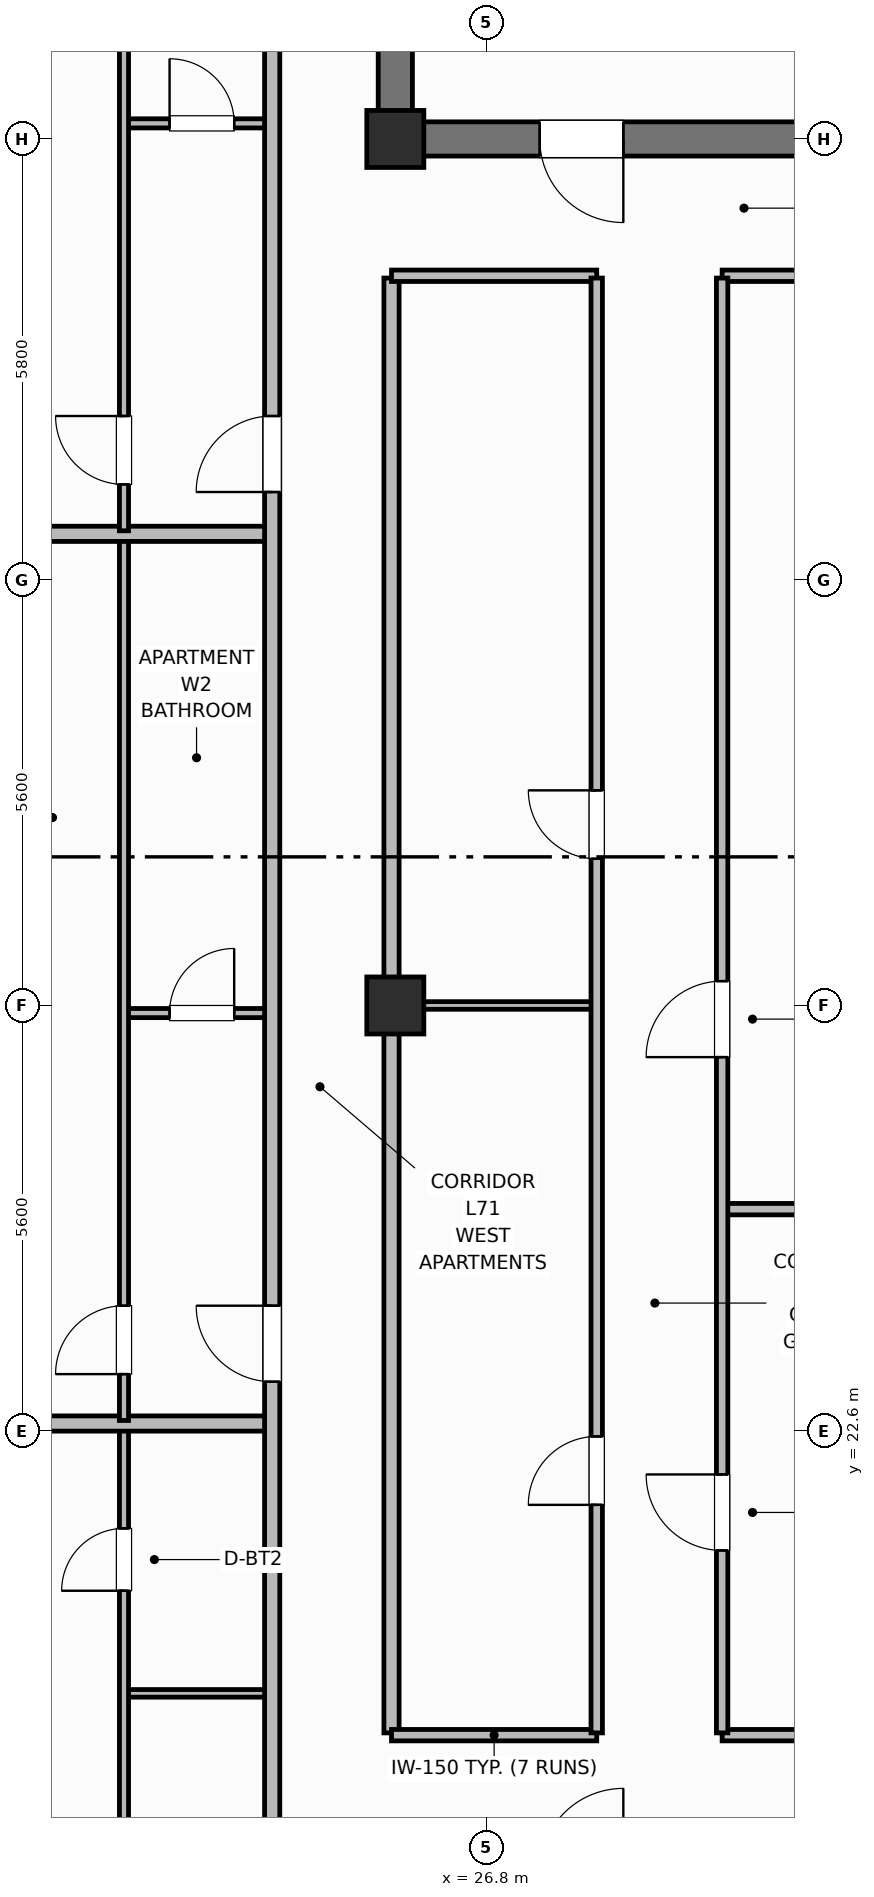
"""IFC4 building model, lengths in metres.
Left out: names, types, materials, properties, quantities, classifications, styles, units other than length and angle.
Written with IfcOpenShell. Run it as: python <this file> out.ifc"""

import sys

from ifc_helpers import new_model, si_unit, direction, frame, frame_2d, origin, origin_2d, place, context, subcontext, project, spatial, rectangle, extrude, element, fill, save


model = new_model("IFC4")
c1 = context("Model", 3, precision=1e-05, world=origin(), true_north=direction((0.0, 1.0)))
c2 = subcontext(c1, "Body", "Model", "MODEL_VIEW")
j1 = project(units=[si_unit("LENGTHUNIT", "METRE"), si_unit("PLANEANGLEUNIT", "RADIAN")], contexts=[c1])
p1 = place(None, origin())
s1 = spatial("IfcSite", under=j1, at=p1, CompositionType="ELEMENT")
p2 = place(p1, origin())
s2 = spatial("IfcBuilding", under=s1, at=p2, CompositionType="ELEMENT")
p3 = place(p2, frame((0.0, 0.0, 282.4)))
s3 = spatial("IfcBuildingStorey", under=s2, at=p3, CompositionType="ELEMENT", Elevation=282.4)
p4 = place(p3, frame((25.6, 39.825, 0.0), z_axis=(0.0, 0.0, 1.0), x_axis=(0.0, 1.0, 0.0)))
e1 = element("IfcWall", 1, at=p4, inside=s3, PredefinedType="SHEAR", context=c2, shape_type="SweptSolid", body=[
    extrude(rectangle(XDim=5.75, YDim=0.45, at=frame_2d((2.875, 0.0))), origin(), (0.0, 0.0, 1.0), 3.7),
])
p5 = place(p3, frame((52.8, 39.6, 0.0), z_axis=(0.0, 0.0, 1.0), x_axis=(-1.0, 0.0, 0.0)))
e2 = element("IfcWall", 2, at=p5, inside=s3, PredefinedType="SHEAR", context=c2, shape_type="SweptSolid", body=[
    extrude(rectangle(XDim=27.2, YDim=0.45, at=frame_2d((13.6, 0.0))), origin(), (0.0, 0.0, 1.0), 3.7),
])
p6 = place(p5, frame((24.2, 0.0, 0.0)))
e3 = element("IfcOpeningElement", 3, at=p6, cuts=e2, PredefinedType="OPENING", context=c2, shape_type="SweptSolid", body=[
    extrude(rectangle(XDim=1.1, YDim=2.15, at=frame_2d((0.55, 1.075))), frame((0.0, 0.235, 0.0), z_axis=(0.0, -1.0, 0.0), x_axis=(1.0, 0.0, 0.0)), (0.0, 0.0, 1.0), 0.47),
])
p7 = place(p5, frame((15.1, 0.0, 0.0)))
e4 = element("IfcOpeningElement", 4, at=p7, cuts=e2, PredefinedType="OPENING", context=c2, shape_type="SweptSolid", body=[
    extrude(rectangle(XDim=1.2, YDim=2.15, at=frame_2d((0.6, 1.075))), frame((0.0, 0.235, 0.0), z_axis=(0.0, -1.0, 0.0), x_axis=(1.0, 0.0, 0.0)), (0.0, 0.0, 1.0), 0.47),
])
p8 = place(p5, frame((11.6, 0.0, 0.0)))
e5 = element("IfcOpeningElement", 5, at=p8, cuts=e2, PredefinedType="OPENING", context=c2, shape_type="SweptSolid", body=[
    extrude(rectangle(XDim=0.9, YDim=2.1, at=frame_2d((0.45, 1.05))), frame((0.0, 0.235, 0.0), z_axis=(0.0, -1.0, 0.0), x_axis=(1.0, 0.0, 0.0)), (0.0, 0.0, 1.0), 0.47),
])
p9 = place(p5, frame((7.35, 0.0, 0.0)))
e6 = element("IfcOpeningElement", 6, at=p9, cuts=e2, PredefinedType="OPENING", context=c2, shape_type="SweptSolid", body=[
    extrude(rectangle(XDim=0.85, YDim=2.1, at=frame_2d((0.425, 1.05))), frame((0.0, 0.235, 0.0), z_axis=(0.0, -1.0, 0.0), x_axis=(1.0, 0.0, 0.0)), (0.0, 0.0, 1.0), 0.47),
])
p10 = place(p5, frame((4.2, 0.0, 0.0)))
e7 = element("IfcOpeningElement", 7, at=p10, cuts=e2, PredefinedType="OPENING", context=c2, shape_type="SweptSolid", body=[
    extrude(rectangle(XDim=1.3, YDim=2.2, at=frame_2d((0.65, 1.1))), frame((0.0, 0.235, 0.0), z_axis=(0.0, -1.0, 0.0), x_axis=(1.0, 0.0, 0.0)), (0.0, 0.0, 1.0), 0.47),
])
for number, where, z_axis, x_axis in (
    (8, (25.6, 39.6, 0.0), (0.0, 0.0, 1.0), (1.0, 0.0, 0.0)),
    (9, (25.6, 28.2, 0.0), (0.0, 0.0, 1.0), (1.0, 0.0, 0.0)),
):
    element("IfcColumn", number, at=place(p3, frame(where, z_axis=z_axis, x_axis=x_axis)), inside=s3, PredefinedType="COLUMN", context=c2, shape_type="SweptSolid", body=[
        extrude(rectangle(XDim=0.75, YDim=0.75, at=origin_2d()), origin(), (0.0, 0.0, 1.0), 3.7),
    ])
p11 = place(p3, frame((25.55, 18.63, 0.0), z_axis=(0.0, 0.0, 1.0), x_axis=(0.0, 1.0, 0.0)))
e10 = element("IfcWall", 10, at=p11, inside=s3, PredefinedType="PARTITIONING", context=c2, shape_type="SweptSolid", body=[
    extrude(rectangle(XDim=19.14, YDim=0.2, at=frame_2d((9.57, 0.0))), origin(), (0.0, 0.0, 1.0), 2.56),
])
p12 = place(p3, frame((25.55, 18.6, 0.0), z_axis=(0.0, 0.0, 1.0), x_axis=(1.0, 0.0, 0.0)))
e11 = element("IfcWall", 11, at=p12, inside=s3, PredefinedType="PARTITIONING", context=c2, shape_type="SweptSolid", body=[
    extrude(rectangle(XDim=2.7, YDim=0.15, at=frame_2d((1.35, 0.0))), origin(), (0.0, 0.0, 1.0), 2.56),
])
p13 = place(p3, frame((29.9, 18.6, 0.0), z_axis=(0.0, 0.0, 1.0), x_axis=(1.0, 0.0, 0.0)))
e12 = element("IfcWall", 12, at=p13, inside=s3, PredefinedType="PARTITIONING", context=c2, shape_type="SweptSolid", body=[
    extrude(rectangle(XDim=22.95, YDim=0.15, at=frame_2d((11.475, 0.0))), origin(), (0.0, 0.0, 1.0), 2.56),
])
p14 = place(p3, frame((25.55, 37.8, 0.0), z_axis=(0.0, 0.0, 1.0), x_axis=(1.0, 0.0, 0.0)))
e13 = element("IfcWall", 13, at=p14, inside=s3, PredefinedType="PARTITIONING", context=c2, shape_type="SweptSolid", body=[
    extrude(rectangle(XDim=2.7, YDim=0.15, at=frame_2d((1.35, 0.0))), origin(), (0.0, 0.0, 1.0), 2.56),
])
p15 = place(p3, frame((29.9, 37.8, 0.0), z_axis=(0.0, 0.0, 1.0), x_axis=(1.0, 0.0, 0.0)))
e14 = element("IfcWall", 14, at=p15, inside=s3, PredefinedType="PARTITIONING", context=c2, shape_type="SweptSolid", body=[
    extrude(rectangle(XDim=22.95, YDim=0.15, at=frame_2d((11.475, 0.0))), origin(), (0.0, 0.0, 1.0), 2.56),
])
p16 = place(p3, frame((25.6, 28.2, 0.0), z_axis=(0.0, 0.0, 1.0), x_axis=(1.0, 0.0, 0.0)))
e15 = element("IfcWall", 15, at=p16, inside=s3, PredefinedType="PARTITIONING", context=c2, shape_type="SweptSolid", body=[
    extrude(rectangle(XDim=2.66, YDim=0.1, at=frame_2d((1.33, 0.0))), origin(), (0.0, 0.0, 1.0), 2.56),
])
p17 = place(p3, frame((29.93, 25.521, 0.0), z_axis=(0.0, 0.0, 1.0), x_axis=(1.0, 0.0, 0.0)))
e16 = element("IfcWall", 16, at=p17, inside=s3, PredefinedType="PARTITIONING", context=c2, shape_type="SweptSolid", body=[
    extrude(rectangle(XDim=22.87, YDim=0.15, at=frame_2d((11.435, 0.0))), origin(), (0.0, 0.0, 1.0), 2.56),
])
p18 = place(p3, frame((28.25, 18.63, 0.0), z_axis=(0.0, 0.0, 1.0), x_axis=(0.0, 1.0, 0.0)))
e17 = element("IfcWall", 17, at=p18, inside=s3, PredefinedType="PARTITIONING", context=c2, shape_type="SweptSolid", body=[
    extrude(rectangle(XDim=19.14, YDim=0.15, at=frame_2d((9.57, 0.0))), origin(), (0.0, 0.0, 1.0), 2.56),
])
p19 = place(p18, frame((3.0, 0.0, 0.0)))
e18 = element("IfcOpeningElement", 18, at=p19, cuts=e17, PredefinedType="OPENING", context=c2, shape_type="SweptSolid", body=[
    extrude(rectangle(XDim=0.9, YDim=2.1, at=frame_2d((0.45, 1.05))), frame((0.0, 0.085, 0.0), z_axis=(0.0, -1.0, 0.0), x_axis=(1.0, 0.0, 0.0)), (0.0, 0.0, 1.0), 0.17),
])
p20 = place(p18, frame((11.5, 0.0, 0.0)))
e19 = element("IfcOpeningElement", 19, at=p20, cuts=e17, PredefinedType="OPENING", context=c2, shape_type="SweptSolid", body=[
    extrude(rectangle(XDim=0.9, YDim=2.1, at=frame_2d((0.45, 1.05))), frame((0.0, 0.085, 0.0), z_axis=(0.0, -1.0, 0.0), x_axis=(1.0, 0.0, 0.0)), (0.0, 0.0, 1.0), 0.17),
])
p21 = place(p3, frame((29.9, 18.63, 0.0), z_axis=(0.0, 0.0, 1.0), x_axis=(0.0, 1.0, 0.0)))
e20 = element("IfcWall", 20, at=p21, inside=s3, PredefinedType="PARTITIONING", context=c2, shape_type="SweptSolid", body=[
    extrude(rectangle(XDim=19.14, YDim=0.15, at=frame_2d((9.57, 0.0))), origin(), (0.0, 0.0, 1.0), 2.56),
])
p22 = place(p21, frame((2.4, 0.0, 0.0)))
e21 = element("IfcOpeningElement", 21, at=p22, cuts=e20, PredefinedType="OPENING", context=c2, shape_type="SweptSolid", body=[
    extrude(rectangle(XDim=1.0, YDim=2.15, at=frame_2d((0.5, 1.075))), frame((0.0, 0.085, 0.0), z_axis=(0.0, -1.0, 0.0), x_axis=(1.0, 0.0, 0.0)), (0.0, 0.0, 1.0), 0.17),
])
p23 = place(p21, frame((8.89, 0.0, 0.0)))
e22 = element("IfcOpeningElement", 22, at=p23, cuts=e20, PredefinedType="OPENING", context=c2, shape_type="SweptSolid", body=[
    extrude(rectangle(XDim=1.0, YDim=2.15, at=frame_2d((0.5, 1.075))), frame((0.0, 0.085, 0.0), z_axis=(0.0, -1.0, 0.0), x_axis=(1.0, 0.0, 0.0)), (0.0, 0.0, 1.0), 0.17),
])
p24 = place(p3, frame((22.03, 19.15, 0.0), z_axis=(0.0, 0.0, 1.0), x_axis=(1.0, 0.0, 0.0)))
e23 = element("IfcWall", 23, at=p24, inside=s3, PredefinedType="PARTITIONING", context=c2, shape_type="SweptSolid", body=[
    extrude(rectangle(XDim=1.95, YDim=0.1, at=frame_2d((0.975, 0.0))), origin(), (0.0, 0.0, 1.0), 2.56),
])
p25 = place(p3, frame((22.03, 9.99, 0.0), z_axis=(0.0, 0.0, 1.0), x_axis=(0.0, 1.0, 0.0)))
e24 = element("IfcWall", 24, at=p25, inside=s3, PredefinedType="PARTITIONING", context=c2, shape_type="SweptSolid", body=[
    extrude(rectangle(XDim=12.67, YDim=0.12, at=frame_2d((6.335, 0.0))), origin(), (0.0, 0.0, 1.0), 2.56),
])
p26 = place(p25, frame((0.41, 0.0, 0.0)))
e25 = element("IfcOpeningElement", 25, at=p26, cuts=e24, PredefinedType="OPENING", context=c2, shape_type="SweptSolid", body=[
    extrude(rectangle(XDim=0.9, YDim=2.1, at=frame_2d((0.45, 1.05))), frame((0.0, 0.07, 0.0), z_axis=(0.0, -1.0, 0.0), x_axis=(1.0, 0.0, 0.0)), (0.0, 0.0, 1.0), 0.14),
])
p27 = place(p25, frame((10.51, 0.0, 0.0)))
e26 = element("IfcOpeningElement", 26, at=p27, cuts=e24, PredefinedType="OPENING", context=c2, shape_type="SweptSolid", body=[
    extrude(rectangle(XDim=0.82, YDim=2.08, at=frame_2d((0.41, 1.04))), frame((0.0, 0.07, 0.0), z_axis=(0.0, -1.0, 0.0), x_axis=(1.0, 0.0, 0.0)), (0.0, 0.0, 1.0), 0.14),
])
p28 = place(p3, frame((19.53, 22.7, 0.0), z_axis=(0.0, 0.0, 1.0), x_axis=(1.0, 0.0, 0.0)))
e27 = element("IfcWall", 27, at=p28, inside=s3, PredefinedType="PARTITIONING", context=c2, shape_type="SweptSolid", body=[
    extrude(rectangle(XDim=4.45, YDim=0.2, at=frame_2d((2.225, 0.0))), origin(), (0.0, 0.0, 1.0), 2.56),
])
p29 = place(p3, frame((22.03, 28.1, 0.0), z_axis=(0.0, 0.0, 1.0), x_axis=(1.0, 0.0, 0.0)))
e28 = element("IfcWall", 28, at=p29, inside=s3, PredefinedType="PARTITIONING", context=c2, shape_type="SweptSolid", body=[
    extrude(rectangle(XDim=1.95, YDim=0.12, at=frame_2d((0.975, 0.0))), origin(), (0.0, 0.0, 1.0), 2.56),
])
p30 = place(p29, frame((0.6, 0.0, 0.0)))
e29 = element("IfcOpeningElement", 29, at=p30, cuts=e28, PredefinedType="OPENING", context=c2, shape_type="SweptSolid", body=[
    extrude(rectangle(XDim=0.85, YDim=2.1, at=frame_2d((0.425, 1.05))), frame((0.0, 0.07, 0.0), z_axis=(0.0, -1.0, 0.0), x_axis=(1.0, 0.0, 0.0)), (0.0, 0.0, 1.0), 0.14),
])
p31 = place(p3, frame((22.03, 22.74, 0.0), z_axis=(0.0, 0.0, 1.0), x_axis=(0.0, 1.0, 0.0)))
e30 = element("IfcWall", 30, at=p31, inside=s3, PredefinedType="PARTITIONING", context=c2, shape_type="SweptSolid", body=[
    extrude(rectangle(XDim=11.625, YDim=0.12, at=frame_2d((5.812, 0.0))), origin(), (0.0, 0.0, 1.0), 2.56),
])
p32 = place(p31, frame((0.61, 0.0, 0.0)))
e31 = element("IfcOpeningElement", 31, at=p32, cuts=e30, PredefinedType="OPENING", context=c2, shape_type="SweptSolid", body=[
    extrude(rectangle(XDim=0.9, YDim=2.1, at=frame_2d((0.45, 1.05))), frame((0.0, 0.07, 0.0), z_axis=(0.0, -1.0, 0.0), x_axis=(1.0, 0.0, 0.0)), (0.0, 0.0, 1.0), 0.14),
])
p33 = place(p3, frame((19.53, 34.405, 0.0), z_axis=(0.0, 0.0, 1.0), x_axis=(1.0, 0.0, 0.0)))
e32 = element("IfcWall", 32, at=p33, inside=s3, PredefinedType="PARTITIONING", context=c2, shape_type="SweptSolid", body=[
    extrude(rectangle(XDim=4.45, YDim=0.2, at=frame_2d((2.225, 0.0))), origin(), (0.0, 0.0, 1.0), 2.56),
])
p34 = place(p3, frame((22.03, 39.805, 0.0), z_axis=(0.0, 0.0, 1.0), x_axis=(1.0, 0.0, 0.0)))
e33 = element("IfcWall", 33, at=p34, inside=s3, PredefinedType="PARTITIONING", context=c2, shape_type="SweptSolid", body=[
    extrude(rectangle(XDim=1.95, YDim=0.12, at=frame_2d((0.975, 0.0))), origin(), (0.0, 0.0, 1.0), 2.56),
])
p35 = place(p34, frame((0.6, 0.0, 0.0)))
e34 = element("IfcOpeningElement", 34, at=p35, cuts=e33, PredefinedType="OPENING", context=c2, shape_type="SweptSolid", body=[
    extrude(rectangle(XDim=0.85, YDim=2.1, at=frame_2d((0.425, 1.05))), frame((0.0, 0.07, 0.0), z_axis=(0.0, -1.0, 0.0), x_axis=(1.0, 0.0, 0.0)), (0.0, 0.0, 1.0), 0.14),
])
p36 = place(p3, frame((22.03, 34.445, 0.0), z_axis=(0.0, 0.0, 1.0), x_axis=(0.0, 1.0, 0.0)))
e35 = element("IfcWall", 35, at=p36, inside=s3, PredefinedType="PARTITIONING", context=c2, shape_type="SweptSolid", body=[
    extrude(rectangle(XDim=11.965, YDim=0.12, at=frame_2d((5.982, 0.0))), origin(), (0.0, 0.0, 1.0), 2.56),
])
p37 = place(p36, frame((0.61, 0.0, 0.0)))
e36 = element("IfcOpeningElement", 36, at=p37, cuts=e35, PredefinedType="OPENING", context=c2, shape_type="SweptSolid", body=[
    extrude(rectangle(XDim=0.9, YDim=2.1, at=frame_2d((0.45, 1.05))), frame((0.0, 0.07, 0.0), z_axis=(0.0, -1.0, 0.0), x_axis=(1.0, 0.0, 0.0)), (0.0, 0.0, 1.0), 0.14),
])
p38 = place(p36, frame((10.157, 0.0, 0.0)))
e37 = element("IfcOpeningElement", 37, at=p38, cuts=e35, PredefinedType="OPENING", context=c2, shape_type="SweptSolid", body=[
    extrude(rectangle(XDim=0.82, YDim=2.08, at=frame_2d((0.41, 1.04))), frame((0.0, 0.07, 0.0), z_axis=(0.0, -1.0, 0.0), x_axis=(1.0, 0.0, 0.0)), (0.0, 0.0, 1.0), 0.14),
])
p39 = place(p3, frame((23.98, 9.95, 0.0), z_axis=(0.0, 0.0, 1.0), x_axis=(0.0, 1.0, 0.0)))
e38 = element("IfcWall", 38, at=p39, inside=s3, PredefinedType="PARTITIONING", context=c2, shape_type="SweptSolid", body=[
    extrude(rectangle(XDim=36.5, YDim=0.2, at=frame_2d((18.25, 0.0))), origin(), (0.0, 0.0, 1.0), 2.56),
])
p40 = place(p39, frame((3.25, 0.0, 0.0)))
e39 = element("IfcOpeningElement", 39, at=p40, cuts=e38, PredefinedType="OPENING", context=c2, shape_type="SweptSolid", body=[
    extrude(rectangle(XDim=1.0, YDim=2.15, at=frame_2d((0.5, 1.075))), frame((0.0, 0.11, 0.0), z_axis=(0.0, -1.0, 0.0), x_axis=(1.0, 0.0, 0.0)), (0.0, 0.0, 1.0), 0.22),
])
p41 = place(p39, frame((13.3, 0.0, 0.0)))
e40 = element("IfcOpeningElement", 40, at=p41, cuts=e38, PredefinedType="OPENING", context=c2, shape_type="SweptSolid", body=[
    extrude(rectangle(XDim=1.0, YDim=2.15, at=frame_2d((0.5, 1.075))), frame((0.0, 0.11, 0.0), z_axis=(0.0, -1.0, 0.0), x_axis=(1.0, 0.0, 0.0)), (0.0, 0.0, 1.0), 0.22),
])
p42 = place(p39, frame((25.005, 0.0, 0.0)))
e41 = element("IfcOpeningElement", 41, at=p42, cuts=e38, PredefinedType="OPENING", context=c2, shape_type="SweptSolid", body=[
    extrude(rectangle(XDim=1.0, YDim=2.15, at=frame_2d((0.5, 1.075))), frame((0.0, 0.11, 0.0), z_axis=(0.0, -1.0, 0.0), x_axis=(1.0, 0.0, 0.0)), (0.0, 0.0, 1.0), 0.22),
])
p43 = place(p19, origin())
e42 = element("IfcDoor", 42, at=p43, inside=s3, OperationType="SINGLE_SWING_LEFT", PredefinedType="DOOR", context=c2, shape_type="SweptSolid", body=[
    extrude(rectangle(XDim=0.9, YDim=2.1, at=frame_2d((0.45, 1.05))), frame((0.0, 0.025, 0.0), z_axis=(0.0, -1.0, 0.0), x_axis=(1.0, 0.0, 0.0)), (0.0, 0.0, 1.0), 0.05),
])
fill(e18, e42)
p44 = place(p20, origin())
e43 = element("IfcDoor", 43, at=p44, inside=s3, OperationType="SINGLE_SWING_RIGHT", PredefinedType="DOOR", context=c2, shape_type="SweptSolid", body=[
    extrude(rectangle(XDim=0.9, YDim=2.1, at=frame_2d((0.45, 1.05))), frame((0.0, 0.025, 0.0), z_axis=(0.0, -1.0, 0.0), x_axis=(1.0, 0.0, 0.0)), (0.0, 0.0, 1.0), 0.05),
])
fill(e19, e43)
p45 = place(p22, origin())
e44 = element("IfcDoor", 44, at=p45, inside=s3, OperationType="SINGLE_SWING_RIGHT", PredefinedType="DOOR", context=c2, shape_type="SweptSolid", body=[
    extrude(rectangle(XDim=1.0, YDim=2.15, at=frame_2d((0.5, 1.075))), frame((0.0, 0.025, 0.0), z_axis=(0.0, -1.0, 0.0), x_axis=(1.0, 0.0, 0.0)), (0.0, 0.0, 1.0), 0.05),
])
fill(e21, e44)
p46 = place(p23, origin())
e45 = element("IfcDoor", 45, at=p46, inside=s3, OperationType="SINGLE_SWING_LEFT", PredefinedType="DOOR", context=c2, shape_type="SweptSolid", body=[
    extrude(rectangle(XDim=1.0, YDim=2.15, at=frame_2d((0.5, 1.075))), frame((0.0, 0.025, 0.0), z_axis=(0.0, -1.0, 0.0), x_axis=(1.0, 0.0, 0.0)), (0.0, 0.0, 1.0), 0.05),
])
fill(e22, e45)
p47 = place(p27, origin())
e46 = element("IfcDoor", 46, at=p47, inside=s3, OperationType="SINGLE_SWING_LEFT", PredefinedType="DOOR", context=c2, shape_type="SweptSolid", body=[
    extrude(rectangle(XDim=0.82, YDim=2.08, at=frame_2d((0.41, 1.04))), frame((0.0, 0.025, 0.0), z_axis=(0.0, -1.0, 0.0), x_axis=(1.0, 0.0, 0.0)), (0.0, 0.0, 1.0), 0.05),
])
fill(e26, e46)
p48 = place(p30, origin())
e47 = element("IfcDoor", 47, at=p48, inside=s3, OperationType="SINGLE_SWING_RIGHT", PredefinedType="DOOR", context=c2, shape_type="SweptSolid", body=[
    extrude(rectangle(XDim=0.85, YDim=2.1, at=frame_2d((0.425, 1.05))), frame((0.0, 0.025, 0.0), z_axis=(0.0, -1.0, 0.0), x_axis=(1.0, 0.0, 0.0)), (0.0, 0.0, 1.0), 0.05),
])
fill(e29, e47)
p49 = place(p32, origin())
e48 = element("IfcDoor", 48, at=p49, inside=s3, OperationType="SINGLE_SWING_LEFT", PredefinedType="DOOR", context=c2, shape_type="SweptSolid", body=[
    extrude(rectangle(XDim=0.9, YDim=2.1, at=frame_2d((0.45, 1.05))), frame((0.0, 0.025, 0.0), z_axis=(0.0, -1.0, 0.0), x_axis=(1.0, 0.0, 0.0)), (0.0, 0.0, 1.0), 0.05),
])
fill(e31, e48)
p50 = place(p35, origin())
e49 = element("IfcDoor", 49, at=p50, inside=s3, OperationType="SINGLE_SWING_LEFT", PredefinedType="DOOR", context=c2, shape_type="SweptSolid", body=[
    extrude(rectangle(XDim=0.85, YDim=2.1, at=frame_2d((0.425, 1.05))), frame((0.0, 0.025, 0.0), z_axis=(0.0, -1.0, 0.0), x_axis=(1.0, 0.0, 0.0)), (0.0, 0.0, 1.0), 0.05),
])
fill(e34, e49)
p51 = place(p37, origin())
e50 = element("IfcDoor", 50, at=p51, inside=s3, OperationType="SINGLE_SWING_RIGHT", PredefinedType="DOOR", context=c2, shape_type="SweptSolid", body=[
    extrude(rectangle(XDim=0.9, YDim=2.1, at=frame_2d((0.45, 1.05))), frame((0.0, 0.025, 0.0), z_axis=(0.0, -1.0, 0.0), x_axis=(1.0, 0.0, 0.0)), (0.0, 0.0, 1.0), 0.05),
])
fill(e36, e50)
p52 = place(p41, origin())
e51 = element("IfcDoor", 51, at=p52, inside=s3, OperationType="SINGLE_SWING_RIGHT", PredefinedType="DOOR", context=c2, shape_type="SweptSolid", body=[
    extrude(rectangle(XDim=1.0, YDim=2.15, at=frame_2d((0.5, 1.075))), frame((0.0, 0.025, 0.0), z_axis=(0.0, -1.0, 0.0), x_axis=(1.0, 0.0, 0.0)), (0.0, 0.0, 1.0), 0.05),
])
fill(e40, e51)
p53 = place(p42, origin())
e52 = element("IfcDoor", 52, at=p53, inside=s3, OperationType="SINGLE_SWING_LEFT", PredefinedType="DOOR", context=c2, shape_type="SweptSolid", body=[
    extrude(rectangle(XDim=1.0, YDim=2.15, at=frame_2d((0.5, 1.075))), frame((0.0, 0.025, 0.0), z_axis=(0.0, -1.0, 0.0), x_axis=(1.0, 0.0, 0.0)), (0.0, 0.0, 1.0), 0.05),
])
fill(e41, e52)
p54 = place(p6, origin())
e53 = element("IfcDoor", 53, at=p54, inside=s3, OperationType="SINGLE_SWING_LEFT", PredefinedType="DOOR", context=c2, shape_type="SweptSolid", body=[
    extrude(rectangle(XDim=1.1, YDim=2.15, at=frame_2d((0.55, 1.075))), frame((0.0, 0.025, 0.0), z_axis=(0.0, -1.0, 0.0), x_axis=(1.0, 0.0, 0.0)), (0.0, 0.0, 1.0), 0.05),
])
fill(e3, e53)
save(model, sys.argv[1])
